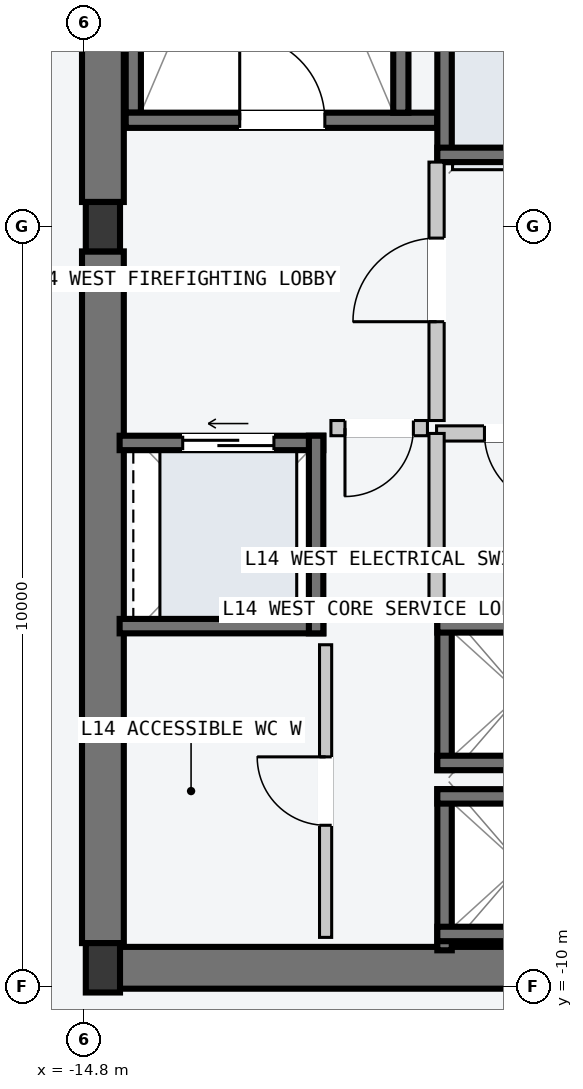
"""IFC4 building model, lengths in metres.
Left out: names, types, materials, properties, quantities, classifications, styles, units other than length and angle.
Written with IfcOpenShell. Run it as: python <this file> out.ifc"""

import sys

from ifc_helpers import new_model, si_unit, direction, frame, frame_2d, origin, origin_2d, place, context, subcontext, project, spatial, rectangle, i_section, extrude, element, fill, save


model = new_model("IFC4")
c1 = context("Model", 3, precision=1e-05, world=origin(), true_north=direction((0.0, 1.0)))
c2 = subcontext(c1, "Body", "Model", "MODEL_VIEW")
j1 = project(units=[si_unit("LENGTHUNIT", "METRE"), si_unit("PLANEANGLEUNIT", "RADIAN")], contexts=[c1])
p1 = place(None, origin())
s1 = spatial("IfcSite", under=j1, at=p1, CompositionType="ELEMENT")
p2 = place(p1, origin())
s2 = spatial("IfcBuilding", under=s1, at=p2, CompositionType="ELEMENT")
p3 = place(p2, frame((0.0, 0.0, 56.4)))
s3 = spatial("IfcBuildingStorey", under=s2, at=p3, CompositionType="ELEMENT", Elevation=56.4)
p4 = place(p3, frame((-14.53, -9.75, -0.2), z_axis=(0.0, 0.0, 1.0), x_axis=(1.0, 0.0, 0.0)))
e1 = element("IfcWall", 1, at=p4, inside=s3, PredefinedType="SHEAR", context=c2, shape_type="SweptSolid", body=[
    extrude(rectangle(XDim=6.46, YDim=0.55, at=frame_2d((3.23, 0.0))), origin(), (0.0, 0.0, 1.0), 3.6),
])
for number, where, z_axis, x_axis in (
    (2, (-14.55, -9.425, -0.2), (0.0, 0.0, 1.0), (0.0, 1.0, 0.0)),
    (3, (-14.55, 0.325, -0.2), (0.0, 0.0, 1.0), (0.0, 1.0, 0.0)),
):
    element("IfcWall", number, at=place(p3, frame(where, z_axis=z_axis, x_axis=x_axis)), inside=s3, PredefinedType="SHEAR", context=c2, shape_type="SweptSolid", body=[
        extrude(rectangle(XDim=9.1, YDim=0.55, at=frame_2d((4.55, 0.0))), origin(), (0.0, 0.0, 1.0), 3.6),
    ])
p5 = place(p3, frame((-14.15, 1.5, -0.2), z_axis=(0.0, 0.0, 1.0), x_axis=(0.0, 1.0, 0.0)))
e4 = element("IfcWall", 4, at=p5, inside=s3, PredefinedType="SOLIDWALL", context=c2, shape_type="SweptSolid", body=[
    extrude(rectangle(XDim=7.8, YDim=0.2, at=frame_2d((3.9, 0.0))), origin(), (0.0, 0.0, 1.0), 3.6),
])
p6 = place(p3, frame((-14.25, 1.4, -0.2), z_axis=(0.0, 0.0, 1.0), x_axis=(1.0, 0.0, 0.0)))
e5 = element("IfcWall", 5, at=p6, inside=s3, PredefinedType="SOLIDWALL", context=c2, shape_type="SweptSolid", body=[
    extrude(rectangle(XDim=4.1, YDim=0.2, at=frame_2d((2.05, 0.0))), origin(), (0.0, 0.0, 1.0), 3.6),
])
p7 = place(p6, frame((1.5, 0.0, 0.2)))
e6 = element("IfcOpeningElement", 6, at=p7, cuts=e5, PredefinedType="OPENING", context=c2, shape_type="SweptSolid", body=[
    extrude(rectangle(XDim=1.12, YDim=2.18, at=frame_2d((0.56, 1.09))), frame((0.0, 0.11, 0.0), z_axis=(0.0, -1.0, 0.0), x_axis=(1.0, 0.0, 0.0)), (0.0, 0.0, 1.0), 0.22),
])
p8 = place(p3, frame((-10.63, 1.5, -0.2), z_axis=(0.0, 0.0, 1.0), x_axis=(0.0, 1.0, 0.0)))
e7 = element("IfcWall", 7, at=p8, inside=s3, PredefinedType="SOLIDWALL", context=c2, shape_type="SweptSolid", body=[
    extrude(rectangle(XDim=7.8, YDim=0.2, at=frame_2d((3.9, 0.0))), origin(), (0.0, 0.0, 1.0), 3.6),
])
for number, where, z_axis, x_axis in (
    (8, (-14.55, -9.75, 0.0), (0.0, 0.0, 1.0), (1.0, 0.0, 0.0)),
    (9, (-14.55, 0.0, 0.0), (0.0, 0.0, 1.0), (1.0, 0.0, 0.0)),
):
    element("IfcColumn", number, at=place(p3, frame(where, z_axis=z_axis, x_axis=x_axis)), inside=s3, PredefinedType="COLUMN", context=c2, shape_type="SweptSolid", body=[
        extrude(i_section(OverallWidth=0.45, OverallDepth=0.65, WebThickness=0.025, FlangeThickness=0.04, at=origin_2d()), origin(), (0.0, 0.0, 1.0), 3.6),
    ])
p9 = place(p3, frame((-10.055, 0.85, -0.2), z_axis=(0.0, 0.0, 1.0), x_axis=(0.0, 1.0, 0.0)))
e10 = element("IfcWall", 10, at=p9, inside=s3, PredefinedType="SOLIDWALL", context=c2, shape_type="SweptSolid", body=[
    extrude(rectangle(XDim=1.9, YDim=0.19, at=frame_2d((0.95, 0.0))), origin(), (0.0, 0.0, 1.0), 3.6),
])
p10 = place(p3, frame((-10.15, 0.945, -0.2), z_axis=(0.0, 0.0, 1.0), x_axis=(1.0, 0.0, 0.0)))
e11 = element("IfcWall", 11, at=p10, inside=s3, PredefinedType="SOLIDWALL", context=c2, shape_type="SweptSolid", body=[
    extrude(rectangle(XDim=2.2, YDim=0.19, at=frame_2d((1.1, 0.0))), origin(), (0.0, 0.0, 1.0), 3.6),
])
p11 = place(p3, frame((-10.055, -9.52, -0.2), z_axis=(0.0, 0.0, 1.0), x_axis=(0.0, 1.0, 0.0)))
e12 = element("IfcWall", 12, at=p11, inside=s3, PredefinedType="SOLIDWALL", context=c2, shape_type="SweptSolid", body=[
    extrude(rectangle(XDim=2.12, YDim=0.19, at=frame_2d((1.06, 0.0))), origin(), (0.0, 0.0, 1.0), 3.6),
])
for number, where, z_axis, x_axis in (
    (13, (-10.15, -7.495, -0.2), (0.0, 0.0, 1.0), (1.0, 0.0, 0.0)),
    (14, (-10.15, -9.305, -0.2), (0.0, 0.0, 1.0), (1.0, 0.0, 0.0)),
):
    element("IfcWall", number, at=place(p3, frame(where, z_axis=z_axis, x_axis=x_axis)), inside=s3, PredefinedType="SOLIDWALL", context=c2, shape_type="SweptSolid", body=[
        extrude(rectangle(XDim=2.2, YDim=0.19, at=frame_2d((1.1, 0.0))), origin(), (0.0, 0.0, 1.0), 3.6),
    ])
p12 = place(p3, frame((-10.055, -7.15, -0.2), z_axis=(0.0, 0.0, 1.0), x_axis=(0.0, 1.0, 0.0)))
e15 = element("IfcWall", 15, at=p12, inside=s3, PredefinedType="SOLIDWALL", context=c2, shape_type="SweptSolid", body=[
    extrude(rectangle(XDim=2.0, YDim=0.19, at=frame_2d((1.0, 0.0))), origin(), (0.0, 0.0, 1.0), 3.6),
])
for number, where, z_axis, x_axis in (
    (16, (-10.15, -5.245, -0.2), (0.0, 0.0, 1.0), (1.0, 0.0, 0.0)),
    (17, (-10.15, -7.055, -0.2), (0.0, 0.0, 1.0), (1.0, 0.0, 0.0)),
):
    element("IfcWall", number, at=place(p3, frame(where, z_axis=z_axis, x_axis=x_axis)), inside=s3, PredefinedType="SOLIDWALL", context=c2, shape_type="SweptSolid", body=[
        extrude(rectangle(XDim=2.2, YDim=0.19, at=frame_2d((1.1, 0.0))), origin(), (0.0, 0.0, 1.0), 3.6),
    ])
p13 = place(p3, frame((-14.33, -2.845, -0.2), z_axis=(0.0, 0.0, 1.0), x_axis=(1.0, 0.0, 0.0)))
e18 = element("IfcWall", 18, at=p13, inside=s3, PredefinedType="SOLIDWALL", context=c2, shape_type="SweptSolid", body=[
    extrude(rectangle(XDim=2.68, YDim=0.19, at=frame_2d((1.34, 0.0))), origin(), (0.0, 0.0, 1.0), 3.6),
])
p14 = place(p13, frame((0.83, 0.0, 0.2)))
e19 = element("IfcOpeningElement", 19, at=p14, cuts=e18, PredefinedType="OPENING", context=c2, shape_type="SweptSolid", body=[
    extrude(rectangle(XDim=1.2, YDim=2.2, at=frame_2d((0.6, 1.1))), frame((0.0, 0.105, 0.0), z_axis=(0.0, -1.0, 0.0), x_axis=(1.0, 0.0, 0.0)), (0.0, 0.0, 1.0), 0.21),
])
p15 = place(p3, frame((-14.33, -5.255, -0.2), z_axis=(0.0, 0.0, 1.0), x_axis=(1.0, 0.0, 0.0)))
e20 = element("IfcWall", 20, at=p15, inside=s3, PredefinedType="SOLIDWALL", context=c2, shape_type="SweptSolid", body=[
    extrude(rectangle(XDim=2.68, YDim=0.19, at=frame_2d((1.34, 0.0))), origin(), (0.0, 0.0, 1.0), 3.6),
])
p16 = place(p3, frame((-11.745, -5.35, -0.2), z_axis=(0.0, 0.0, 1.0), x_axis=(0.0, 1.0, 0.0)))
e21 = element("IfcWall", 21, at=p16, inside=s3, PredefinedType="SOLIDWALL", context=c2, shape_type="SweptSolid", body=[
    extrude(rectangle(XDim=2.6, YDim=0.19, at=frame_2d((1.3, 0.0))), origin(), (0.0, 0.0, 1.0), 3.6),
])
p17 = place(p3, frame((-10.16, -2.55, 0.0), z_axis=(0.0, 0.0, 1.0), x_axis=(0.0, 1.0, 0.0)))
e22 = element("IfcWall", 22, at=p17, inside=s3, PredefinedType="PARTITIONING", context=c2, shape_type="SweptSolid", body=[
    extrude(rectangle(XDim=3.4, YDim=0.2, at=frame_2d((1.7, 0.0))), origin(), (0.0, 0.0, 1.0), 3.4),
])
p18 = place(p17, frame((1.3, 0.0, 0.0)))
e23 = element("IfcOpeningElement", 23, at=p18, cuts=e22, PredefinedType="OPENING", context=c2, shape_type="SweptSolid", body=[
    extrude(rectangle(XDim=1.1, YDim=2.15, at=frame_2d((0.55, 1.075))), frame((0.0, 0.11, 0.0), z_axis=(0.0, -1.0, 0.0), x_axis=(1.0, 0.0, 0.0)), (0.0, 0.0, 1.0), 0.22),
])
p19 = place(p3, frame((-10.28, -2.65, 0.0), z_axis=(0.0, 0.0, 1.0), x_axis=(-1.0, 0.0, 0.0)))
e24 = element("IfcWall", 24, at=p19, inside=s3, PredefinedType="PARTITIONING", context=c2, shape_type="SweptSolid", body=[
    extrude(rectangle(XDim=1.27, YDim=0.2, at=frame_2d((0.635, 0.0))), origin(), (0.0, 0.0, 1.0), 3.4),
])
p20 = place(p19, frame((0.185, 0.0, 0.0)))
e25 = element("IfcOpeningElement", 25, at=p20, cuts=e24, PredefinedType="OPENING", context=c2, shape_type="SweptSolid", body=[
    extrude(rectangle(XDim=0.9, YDim=2.15, at=frame_2d((0.45, 1.075))), frame((0.0, 0.11, 0.0), z_axis=(0.0, -1.0, 0.0), x_axis=(1.0, 0.0, 0.0)), (0.0, 0.0, 1.0), 0.22),
])
p21 = place(p3, frame((-7.96, -2.72, 0.0), z_axis=(0.0, 0.0, 1.0), x_axis=(-1.0, 0.0, 0.0)))
e26 = element("IfcWall", 26, at=p21, inside=s3, PredefinedType="PARTITIONING", context=c2, shape_type="SweptSolid", body=[
    extrude(rectangle(XDim=2.2, YDim=0.2, at=frame_2d((1.1, 0.0))), origin(), (0.0, 0.0, 1.0), 3.4),
])
p22 = place(p21, frame((0.62, 0.0, 0.0)))
e27 = element("IfcOpeningElement", 27, at=p22, cuts=e26, PredefinedType="OPENING", context=c2, shape_type="SweptSolid", body=[
    extrude(rectangle(XDim=0.95, YDim=2.1, at=frame_2d((0.475, 1.05))), frame((0.0, 0.11, 0.0), z_axis=(0.0, -1.0, 0.0), x_axis=(1.0, 0.0, 0.0)), (0.0, 0.0, 1.0), 0.22),
])
p23 = place(p3, frame((-10.16, -5.16, 0.0), z_axis=(0.0, 0.0, 1.0), x_axis=(0.0, 1.0, 0.0)))
e28 = element("IfcWall", 28, at=p23, inside=s3, PredefinedType="PARTITIONING", context=c2, shape_type="SweptSolid", body=[
    extrude(rectangle(XDim=2.44, YDim=0.2, at=frame_2d((1.22, 0.0))), origin(), (0.0, 0.0, 1.0), 3.4),
])
p24 = place(p3, frame((-11.62, -9.35, 0.0), z_axis=(0.0, 0.0, 1.0), x_axis=(0.0, 1.0, 0.0)))
e29 = element("IfcWall", 29, at=p24, inside=s3, PredefinedType="PARTITIONING", context=c2, shape_type="SweptSolid", body=[
    extrude(rectangle(XDim=3.85, YDim=0.16, at=frame_2d((1.925, 0.0))), origin(), (0.0, 0.0, 1.0), 3.4),
])
p25 = place(p24, frame((1.475, 0.0, 0.0)))
e30 = element("IfcOpeningElement", 30, at=p25, cuts=e29, PredefinedType="OPENING", context=c2, shape_type="SweptSolid", body=[
    extrude(rectangle(XDim=0.9, YDim=2.15, at=frame_2d((0.45, 1.075))), frame((0.0, 0.09, 0.0), z_axis=(0.0, -1.0, 0.0), x_axis=(1.0, 0.0, 0.0)), (0.0, 0.0, 1.0), 0.18),
])
p26 = place(p7, origin())
e31 = element("IfcDoor", 31, at=p26, inside=s3, OperationType="SINGLE_SWING_LEFT", PredefinedType="DOOR", context=c2, shape_type="SweptSolid", body=[
    extrude(rectangle(XDim=1.12, YDim=2.18, at=frame_2d((0.56, 1.09))), frame((0.0, 0.025, 0.0), z_axis=(0.0, -1.0, 0.0), x_axis=(1.0, 0.0, 0.0)), (0.0, 0.0, 1.0), 0.05),
])
fill(e6, e31)
p27 = place(p14, origin())
e32 = element("IfcDoor", 32, at=p27, inside=s3, OperationType="SLIDING_TO_LEFT", PredefinedType="DOOR", context=c2, shape_type="SweptSolid", body=[
    extrude(rectangle(XDim=1.2, YDim=2.2, at=frame_2d((0.6, 1.1))), frame((0.0, 0.025, 0.0), z_axis=(0.0, -1.0, 0.0), x_axis=(1.0, 0.0, 0.0)), (0.0, 0.0, 1.0), 0.05),
])
fill(e19, e32)
p28 = place(p18, origin())
e33 = element("IfcDoor", 33, at=p28, inside=s3, OperationType="SINGLE_SWING_LEFT", PredefinedType="DOOR", context=c2, shape_type="SweptSolid", body=[
    extrude(rectangle(XDim=1.1, YDim=2.15, at=frame_2d((0.55, 1.075))), frame((0.0, 0.025, 0.0), z_axis=(0.0, -1.0, 0.0), x_axis=(1.0, 0.0, 0.0)), (0.0, 0.0, 1.0), 0.05),
])
fill(e23, e33)
p29 = place(p20, origin())
e34 = element("IfcDoor", 34, at=p29, inside=s3, OperationType="SINGLE_SWING_RIGHT", PredefinedType="DOOR", context=c2, shape_type="SweptSolid", body=[
    extrude(rectangle(XDim=0.9, YDim=2.15, at=frame_2d((0.45, 1.075))), frame((0.0, 0.025, 0.0), z_axis=(0.0, -1.0, 0.0), x_axis=(1.0, 0.0, 0.0)), (0.0, 0.0, 1.0), 0.05),
])
fill(e25, e34)
p30 = place(p22, origin())
e35 = element("IfcDoor", 35, at=p30, inside=s3, OperationType="SINGLE_SWING_LEFT", PredefinedType="DOOR", context=c2, shape_type="SweptSolid", body=[
    extrude(rectangle(XDim=0.95, YDim=2.1, at=frame_2d((0.475, 1.05))), frame((0.0, 0.025, 0.0), z_axis=(0.0, -1.0, 0.0), x_axis=(1.0, 0.0, 0.0)), (0.0, 0.0, 1.0), 0.05),
])
fill(e27, e35)
p31 = place(p25, origin())
e36 = element("IfcDoor", 36, at=p31, inside=s3, OperationType="SINGLE_SWING_RIGHT", PredefinedType="DOOR", context=c2, shape_type="SweptSolid", body=[
    extrude(rectangle(XDim=0.9, YDim=2.15, at=frame_2d((0.45, 1.075))), frame((0.0, 0.025, 0.0), z_axis=(0.0, -1.0, 0.0), x_axis=(1.0, 0.0, 0.0)), (0.0, 0.0, 1.0), 0.05),
])
fill(e30, e36)
save(model, sys.argv[1])
